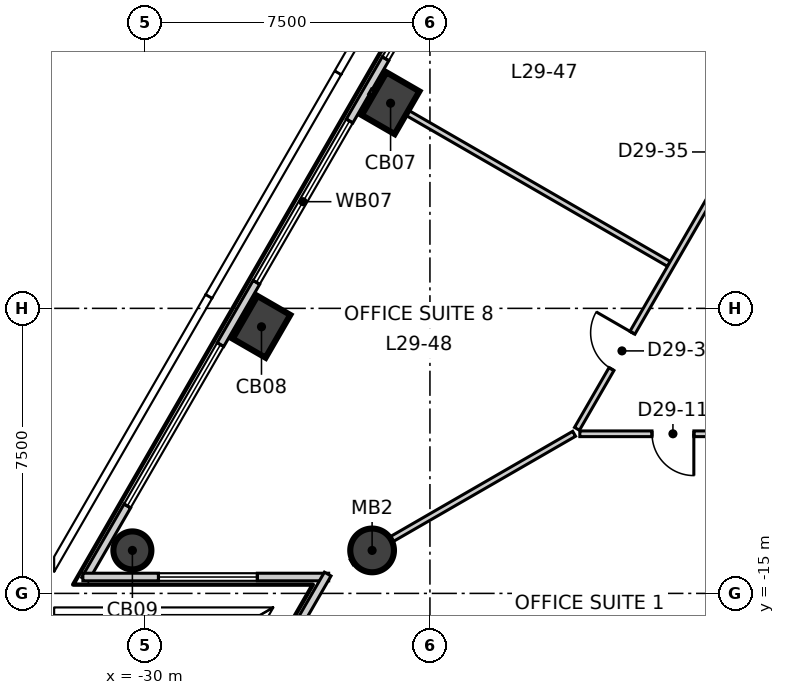
"""IFC4 building model, lengths in metres.
Left out: names, types, materials, properties, quantities, classifications, styles, units other than length and angle.
Written with IfcOpenShell. Run it as: python <this file> out.ifc"""

import sys

from ifc_helpers import new_model, si_unit, direction, frame, frame_2d, origin, origin_2d, place, context, subcontext, project, spatial, rectangle, circle, extrude, element, fill, save


model = new_model("IFC4")
c1 = context("Model", 3, precision=1e-05, world=origin(), true_north=direction((0.0, 1.0)))
c2 = subcontext(c1, "Body", "Model", "MODEL_VIEW")
j1 = project(units=[si_unit("LENGTHUNIT", "METRE"), si_unit("PLANEANGLEUNIT", "RADIAN")], contexts=[c1])
p1 = place(None, origin())
s1 = spatial("IfcSite", under=j1, at=p1, CompositionType="ELEMENT")
p2 = place(p1, origin())
s2 = spatial("IfcBuilding", under=s1, at=p2, CompositionType="ELEMENT")
p3 = place(p2, frame((0.0, 0.0, 128.3)))
s3 = spatial("IfcBuildingStorey", under=s2, at=p3, CompositionType="ELEMENT", Elevation=128.3)
for number, where, z_axis, x_axis in (
    (1, (-23.536, -2.102, -0.3), (0.0, 0.0, 1.0), (0.5, 0.866, 0.0)),
    (2, (-26.933, -7.985, -0.3), (0.0, 0.0, 1.0), (0.5, 0.866, 0.0)),
):
    element("IfcColumn", number, at=place(p3, frame(where, z_axis=z_axis, x_axis=x_axis)), inside=s3, PredefinedType="COLUMN", context=c2, shape_type="SweptSolid", body=[
        extrude(rectangle(XDim=1.3, YDim=1.0, at=origin_2d()), origin(), (0.0, 0.0, 1.0), 4.0),
    ])
p4 = place(p3, frame((-30.33, -13.869, -0.3), z_axis=(0.0, 0.0, 1.0), x_axis=(0.5, 0.866025403784, 0.0)))
e3 = element("IfcColumn", 3, at=p4, inside=s3, PredefinedType="COLUMN", context=c2, shape_type="SweptSolid", body=[
    extrude(circle(Radius=0.5, at=origin_2d()), origin(), (0.0, 0.0, 1.0), 4.0),
])
p5 = place(p3, frame((-24.022, -13.869, -0.3), z_axis=(0.0, 0.0, 1.0), x_axis=(1.0, 0.0, 0.0)))
e4 = element("IfcColumn", 4, at=p5, inside=s3, PredefinedType="COLUMN", context=c2, shape_type="SweptSolid", body=[
    extrude(circle(Radius=0.575, at=origin_2d()), origin(), (0.0, 0.0, 1.0), 4.0),
])
p6 = place(p3, frame((-3.109, 34.679, 0.0), z_axis=(0.0, 0.0, 1.0), x_axis=(-0.50000689325, -0.866021423928, 0.0)))
e5 = element("IfcWall", 5, at=p6, inside=s3, PredefinedType="ELEMENTEDWALL", context=c2, shape_type="SweptSolid", body=[
    extrude(rectangle(XDim=56.937, YDim=0.2, at=frame_2d((28.469, 0.0))), origin(), (0.0, 0.0, 1.0), 3.7),
])
p7 = place(p6, frame((2.249, 0.0, 0.9)))
e6 = element("IfcOpeningElement", 6, at=p7, cuts=e5, PredefinedType="OPENING", context=c2, shape_type="SweptSolid", body=[
    extrude(rectangle(XDim=4.9, YDim=2.5, at=frame_2d((2.45, 1.25))), frame((0.0, 0.11, 0.0), z_axis=(0.0, -1.0, 0.0), x_axis=(1.0, 0.0, 0.0)), (0.0, 0.0, 1.0), 0.22),
])
p8 = place(p6, frame((9.043, 0.0, 0.9)))
e7 = element("IfcOpeningElement", 7, at=p8, cuts=e5, PredefinedType="OPENING", context=c2, shape_type="SweptSolid", body=[
    extrude(rectangle(XDim=4.9, YDim=2.5, at=frame_2d((2.45, 1.25))), frame((0.0, 0.11, 0.0), z_axis=(0.0, -1.0, 0.0), x_axis=(1.0, 0.0, 0.0)), (0.0, 0.0, 1.0), 0.22),
])
p9 = place(p6, frame((15.837, 0.0, 0.9)))
e8 = element("IfcOpeningElement", 8, at=p9, cuts=e5, PredefinedType="OPENING", context=c2, shape_type="SweptSolid", body=[
    extrude(rectangle(XDim=4.9, YDim=2.5, at=frame_2d((2.45, 1.25))), frame((0.0, 0.11, 0.0), z_axis=(0.0, -1.0, 0.0), x_axis=(1.0, 0.0, 0.0)), (0.0, 0.0, 1.0), 0.22),
])
p10 = place(p6, frame((22.631, 0.0, 0.9)))
e9 = element("IfcOpeningElement", 9, at=p10, cuts=e5, PredefinedType="OPENING", context=c2, shape_type="SweptSolid", body=[
    extrude(rectangle(XDim=4.9, YDim=2.5, at=frame_2d((2.45, 1.25))), frame((0.0, 0.11, 0.0), z_axis=(0.0, -1.0, 0.0), x_axis=(1.0, 0.0, 0.0)), (0.0, 0.0, 1.0), 0.22),
])
p11 = place(p6, frame((29.425, 0.0, 0.9)))
e10 = element("IfcOpeningElement", 10, at=p11, cuts=e5, PredefinedType="OPENING", context=c2, shape_type="SweptSolid", body=[
    extrude(rectangle(XDim=4.9, YDim=2.5, at=frame_2d((2.45, 1.25))), frame((0.0, 0.11, 0.0), z_axis=(0.0, -1.0, 0.0), x_axis=(1.0, 0.0, 0.0)), (0.0, 0.0, 1.0), 0.22),
])
p12 = place(p6, frame((36.219, 0.0, 0.9)))
e11 = element("IfcOpeningElement", 11, at=p12, cuts=e5, PredefinedType="OPENING", context=c2, shape_type="SweptSolid", body=[
    extrude(rectangle(XDim=4.9, YDim=2.5, at=frame_2d((2.45, 1.25))), frame((0.0, 0.11, 0.0), z_axis=(0.0, -1.0, 0.0), x_axis=(1.0, 0.0, 0.0)), (0.0, 0.0, 1.0), 0.22),
])
p13 = place(p6, frame((43.013, 0.0, 0.9)))
e12 = element("IfcOpeningElement", 12, at=p13, cuts=e5, PredefinedType="OPENING", context=c2, shape_type="SweptSolid", body=[
    extrude(rectangle(XDim=4.9, YDim=2.5, at=frame_2d((2.45, 1.25))), frame((0.0, 0.11, 0.0), z_axis=(0.0, -1.0, 0.0), x_axis=(1.0, 0.0, 0.0)), (0.0, 0.0, 1.0), 0.22),
])
p14 = place(p6, frame((49.807, 0.0, 0.9)))
e13 = element("IfcOpeningElement", 13, at=p14, cuts=e5, PredefinedType="OPENING", context=c2, shape_type="SweptSolid", body=[
    extrude(rectangle(XDim=4.9, YDim=2.5, at=frame_2d((2.45, 1.25))), frame((0.0, 0.11, 0.0), z_axis=(0.0, -1.0, 0.0), x_axis=(1.0, 0.0, 0.0)), (0.0, 0.0, 1.0), 0.22),
])
p15 = place(p3, frame((-31.633, -14.569, 0.0), z_axis=(0.0, 0.0, 1.0), x_axis=(1.0, 0.0, 0.0)))
e14 = element("IfcWall", 14, at=p15, inside=s3, PredefinedType="ELEMENTEDWALL", context=c2, shape_type="SweptSolid", body=[
    extrude(rectangle(XDim=6.468, YDim=0.2, at=frame_2d((3.234, 0.0))), origin(), (0.0, 0.0, 1.0), 3.7),
])
p16 = place(p15, frame((1.99, 0.0, 0.9)))
e15 = element("IfcOpeningElement", 15, at=p16, cuts=e14, PredefinedType="OPENING", context=c2, shape_type="SweptSolid", body=[
    extrude(rectangle(XDim=2.6, YDim=2.5, at=frame_2d((1.3, 1.25))), frame((0.0, 0.11, 0.0), z_axis=(0.0, -1.0, 0.0), x_axis=(1.0, 0.0, 0.0)), (0.0, 0.0, 1.0), 0.22),
])
p17 = place(p3, frame((-25.19, -14.491, 0.0), z_axis=(0.0, 0.0, 1.0), x_axis=(-0.499975110204, -0.866039773438, 0.0)))
e16 = element("IfcWall", 16, at=p17, inside=s3, PredefinedType="ELEMENTEDWALL", context=c2, shape_type="SweptSolid", body=[
    extrude(rectangle(XDim=6.469, YDim=0.2, at=frame_2d((3.234, 0.0))), origin(), (0.0, 0.0, 1.0), 3.7),
])
p18 = place(p17, frame((1.39, 0.0, 0.9)))
e17 = element("IfcOpeningElement", 17, at=p18, cuts=e16, PredefinedType="OPENING", context=c2, shape_type="SweptSolid", body=[
    extrude(rectangle(XDim=2.6, YDim=2.5, at=frame_2d((1.3, 1.25))), frame((0.0, 0.11, 0.0), z_axis=(0.0, -1.0, 0.0), x_axis=(1.0, 0.0, 0.0)), (0.0, 0.0, 1.0), 0.22),
])
p19 = place(p3, frame((-24.559, -14.179, 0.0), z_axis=(0.0, 0.0, 1.0), x_axis=(0.866047229553, 0.499962194753, 0.0)))
e18 = element("IfcWall", 18, at=p19, inside=s3, PredefinedType="PARTITIONING", context=c2, shape_type="SweptSolid", body=[
    extrude(rectangle(XDim=6.758, YDim=0.15, at=frame_2d((3.379, 0.0))), origin(), (0.0, 0.0, 1.0), 3.15),
])
p20 = place(p3, frame((-24.073, -1.792, 0.0), z_axis=(0.0, 0.0, 1.0), x_axis=(0.866049876065, -0.49995761037, 0.0)))
e19 = element("IfcWall", 19, at=p20, inside=s3, PredefinedType="PARTITIONING", context=c2, shape_type="SweptSolid", body=[
    extrude(rectangle(XDim=9.077, YDim=0.15, at=frame_2d((4.539, 0.0))), origin(), (0.0, 0.0, 1.0), 3.7),
])
p21 = place(p3, frame((-18.556, -10.8, 0.0), z_axis=(0.0, 0.0, 1.0), x_axis=(1.0, 0.0, 0.0)))
e20 = element("IfcWall", 20, at=p21, inside=s3, PredefinedType="PARTITIONING", context=c2, shape_type="SweptSolid", body=[
    extrude(rectangle(XDim=17.655, YDim=0.15, at=frame_2d((8.828, 0.0))), origin(), (0.0, 0.0, 1.0), 3.7),
])
p22 = place(p21, frame((1.9, 0.0, 0.0)))
e21 = element("IfcOpeningElement", 21, at=p22, cuts=e20, PredefinedType="OPENING", context=c2, shape_type="SweptSolid", body=[
    extrude(rectangle(XDim=1.1, YDim=2.1, at=frame_2d((0.55, 1.05))), frame((0.0, 0.085, 0.0), z_axis=(0.0, -1.0, 0.0), x_axis=(1.0, 0.0, 0.0)), (0.0, 0.0, 1.0), 0.17),
])
p23 = place(p21, frame((10.718, 0.0, 0.0)))
e22 = element("IfcOpeningElement", 22, at=p23, cuts=e20, PredefinedType="OPENING", context=c2, shape_type="SweptSolid", body=[
    extrude(rectangle(XDim=1.1, YDim=2.1, at=frame_2d((0.55, 1.05))), frame((0.0, 0.085, 0.0), z_axis=(0.0, -1.0, 0.0), x_axis=(1.0, 0.0, 0.0)), (0.0, 0.0, 1.0), 0.17),
])
p24 = place(p3, frame((-18.631, -10.67, 0.0), z_axis=(0.0, 0.0, 1.0), x_axis=(0.499976222121, 0.866039131514, 0.0)))
e23 = element("IfcWall", 23, at=p24, inside=s3, PredefinedType="PARTITIONING", context=c2, shape_type="SweptSolid", body=[
    extrude(rectangle(XDim=17.655, YDim=0.15, at=frame_2d((8.828, 0.0))), origin(), (0.0, 0.0, 1.0), 3.7),
])
p25 = place(p24, frame((14.206, 0.0, 0.0)))
e24 = element("IfcOpeningElement", 24, at=p25, cuts=e23, PredefinedType="OPENING", context=c2, shape_type="SweptSolid", body=[
    extrude(rectangle(XDim=1.0, YDim=2.1, at=frame_2d((0.5, 1.05))), frame((0.0, 0.085, 0.0), z_axis=(0.0, -1.0, 0.0), x_axis=(1.0, 0.0, 0.0)), (0.0, 0.0, 1.0), 0.17),
])
p26 = place(p24, frame((7.912, 0.0, 0.0)))
e25 = element("IfcOpeningElement", 25, at=p26, cuts=e23, PredefinedType="OPENING", context=c2, shape_type="SweptSolid", body=[
    extrude(rectangle(XDim=1.0, YDim=2.1, at=frame_2d((0.5, 1.05))), frame((0.0, 0.085, 0.0), z_axis=(0.0, -1.0, 0.0), x_axis=(1.0, 0.0, 0.0)), (0.0, 0.0, 1.0), 0.17),
])
p27 = place(p24, frame((1.818, 0.0, 0.0)))
e26 = element("IfcOpeningElement", 26, at=p27, cuts=e23, PredefinedType="OPENING", context=c2, shape_type="SweptSolid", body=[
    extrude(rectangle(XDim=1.1, YDim=2.1, at=frame_2d((0.55, 1.05))), frame((0.0, 0.085, 0.0), z_axis=(0.0, -1.0, 0.0), x_axis=(1.0, 0.0, 0.0)), (0.0, 0.0, 1.0), 0.17),
])
p28 = place(p12, origin())
e27 = element("IfcWindow", 27, at=p28, inside=s3, PartitioningType="SINGLE_PANEL", PredefinedType="WINDOW", context=c2, shape_type="SweptSolid", body=[
    extrude(rectangle(XDim=4.9, YDim=2.5, at=frame_2d((2.45, 1.25))), frame((0.0, 0.03, 0.0), z_axis=(0.0, -1.0, 0.0), x_axis=(1.0, 0.0, 0.0)), (0.0, 0.0, 1.0), 0.06),
])
fill(e11, e27)
p29 = place(p13, origin())
e28 = element("IfcWindow", 28, at=p29, inside=s3, PartitioningType="SINGLE_PANEL", PredefinedType="WINDOW", context=c2, shape_type="SweptSolid", body=[
    extrude(rectangle(XDim=4.9, YDim=2.5, at=frame_2d((2.45, 1.25))), frame((0.0, 0.03, 0.0), z_axis=(0.0, -1.0, 0.0), x_axis=(1.0, 0.0, 0.0)), (0.0, 0.0, 1.0), 0.06),
])
fill(e12, e28)
p30 = place(p14, origin())
e29 = element("IfcWindow", 29, at=p30, inside=s3, PartitioningType="SINGLE_PANEL", PredefinedType="WINDOW", context=c2, shape_type="SweptSolid", body=[
    extrude(rectangle(XDim=4.9, YDim=2.5, at=frame_2d((2.45, 1.25))), frame((0.0, 0.03, 0.0), z_axis=(0.0, -1.0, 0.0), x_axis=(1.0, 0.0, 0.0)), (0.0, 0.0, 1.0), 0.06),
])
fill(e13, e29)
p31 = place(p16, origin())
e30 = element("IfcWindow", 30, at=p31, inside=s3, PartitioningType="SINGLE_PANEL", PredefinedType="WINDOW", context=c2, shape_type="SweptSolid", body=[
    extrude(rectangle(XDim=2.6, YDim=2.5, at=frame_2d((1.3, 1.25))), frame((0.0, 0.03, 0.0), z_axis=(0.0, -1.0, 0.0), x_axis=(1.0, 0.0, 0.0)), (0.0, 0.0, 1.0), 0.06),
])
fill(e15, e30)
p32 = place(p22, origin())
e31 = element("IfcDoor", 31, at=p32, inside=s3, OperationType="SINGLE_SWING_RIGHT", PredefinedType="DOOR", context=c2, shape_type="SweptSolid", body=[
    extrude(rectangle(XDim=1.1, YDim=2.1, at=frame_2d((0.55, 1.05))), frame((0.0, 0.025, 0.0), z_axis=(0.0, -1.0, 0.0), x_axis=(1.0, 0.0, 0.0)), (0.0, 0.0, 1.0), 0.05),
])
fill(e21, e31)
p33 = place(p27, origin())
e32 = element("IfcDoor", 32, at=p33, inside=s3, OperationType="SINGLE_SWING_LEFT", PredefinedType="DOOR", context=c2, shape_type="SweptSolid", body=[
    extrude(rectangle(XDim=1.1, YDim=2.1, at=frame_2d((0.55, 1.05))), frame((0.0, 0.025, 0.0), z_axis=(0.0, -1.0, 0.0), x_axis=(1.0, 0.0, 0.0)), (0.0, 0.0, 1.0), 0.05),
])
fill(e26, e32)
save(model, sys.argv[1])
